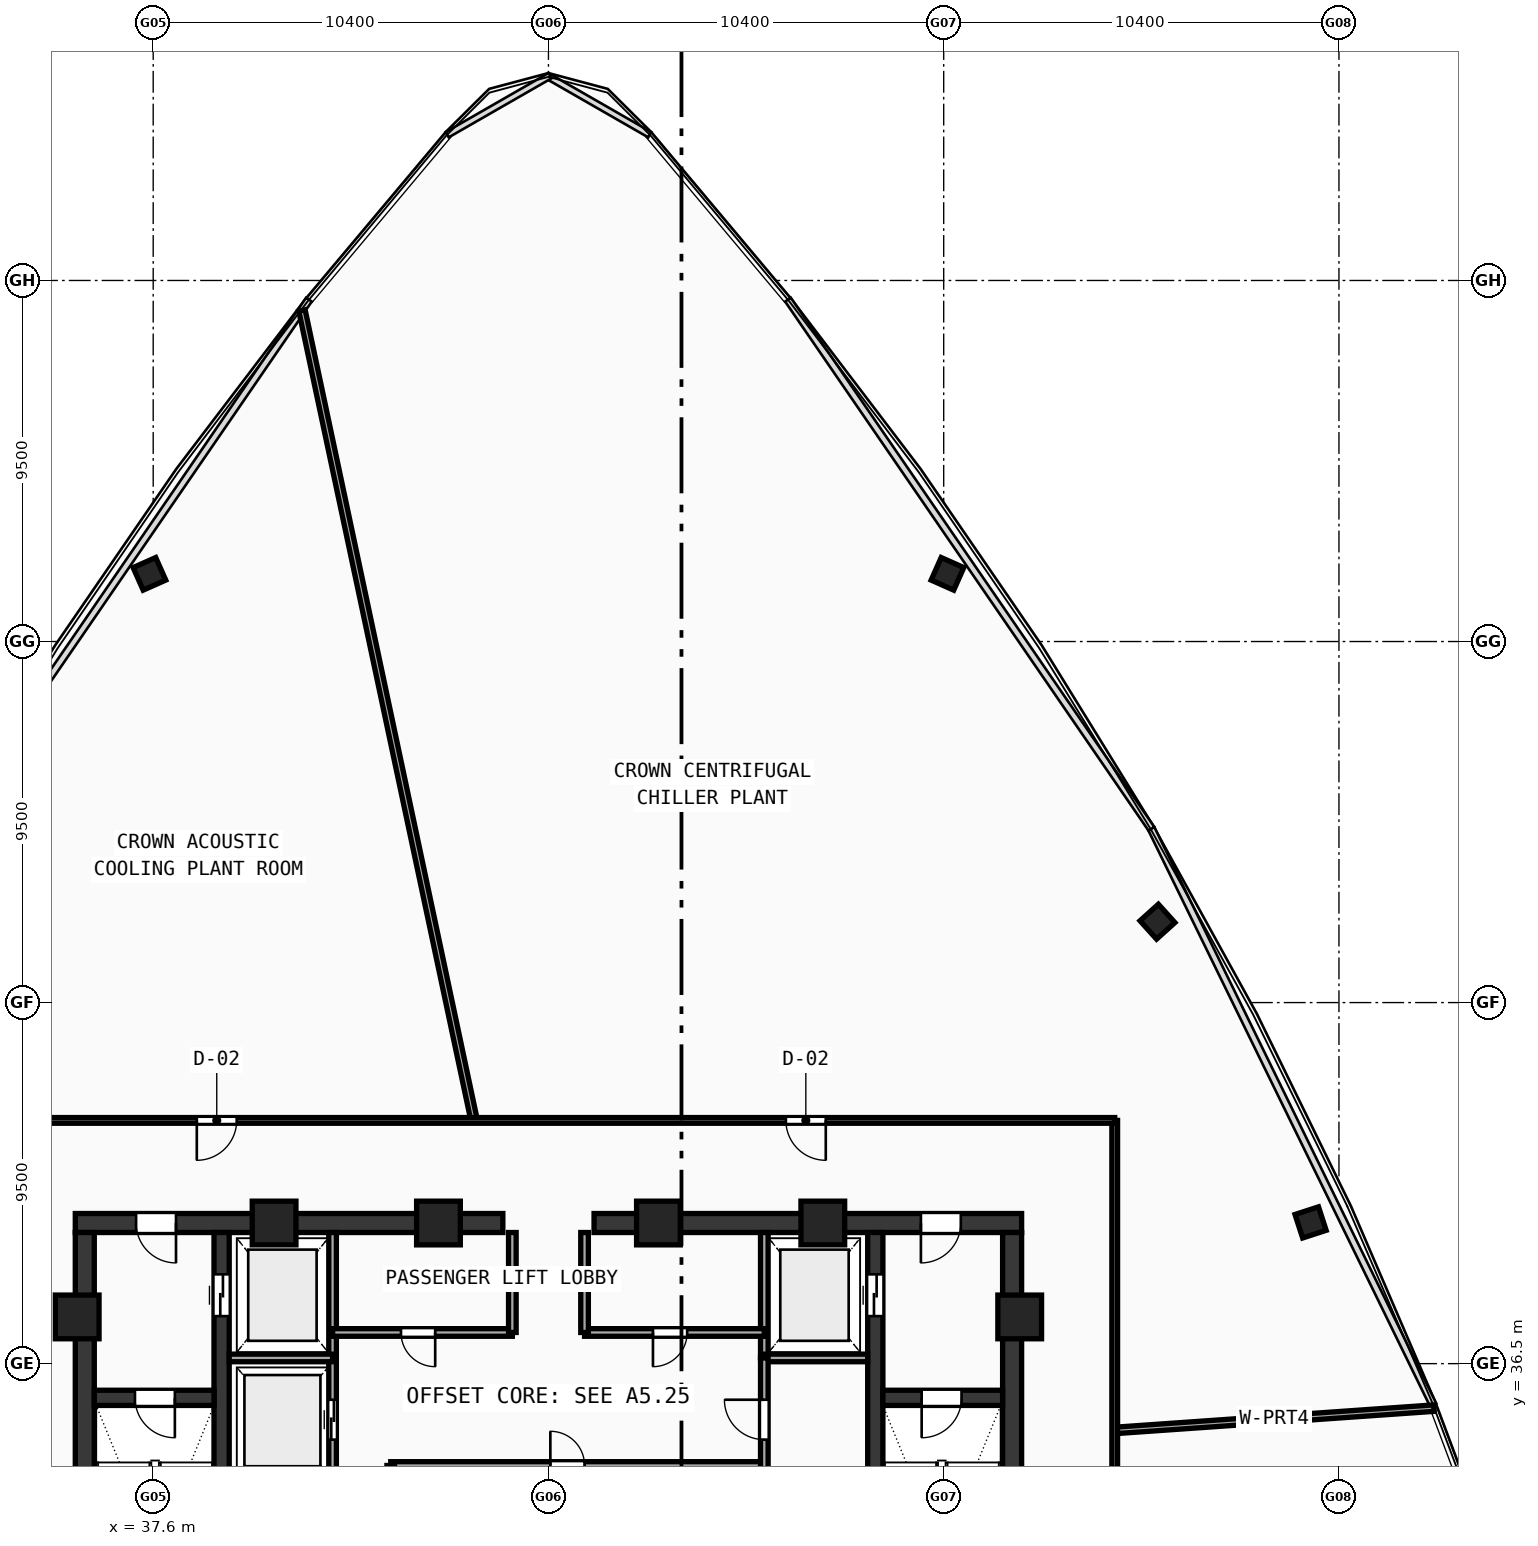
"""IFC4 building model, lengths in metres.
Left out: names, types, materials, properties, quantities, classifications, styles, units other than length and angle.
Written with IfcOpenShell. Run it as: python <this file> out.ifc"""

import sys

from ifc_helpers import new_model, si_unit, direction, frame, frame_2d, origin, origin_with_axes, origin_2d, place, context, subcontext, project, spatial, rectangle, hollow_rectangle, extrude, source, transform, mapped, element, fill, save


model = new_model("IFC4")
c1 = context("Model", 3, precision=1e-05, world=origin(), true_north=direction((0.0, 1.0)))
c2 = subcontext(c1, "Body", "Model", "MODEL_VIEW")
j1 = project(units=[si_unit("LENGTHUNIT", "METRE"), si_unit("PLANEANGLEUNIT", "RADIAN")], contexts=[c1])
p1 = place(None, origin())
s1 = spatial("IfcSite", under=j1, at=p1, CompositionType="ELEMENT")
p2 = place(p1, origin())
s2 = spatial("IfcBuilding", under=s1, at=p2, CompositionType="ELEMENT")
p3 = place(p2, frame((0.0, 0.0, 391.76)))
s3 = spatial("IfcBuildingStorey", under=s2, at=p3, CompositionType="ELEMENT", Elevation=391.76)
p4 = place(p3, frame((35.55, 40.2, 0.0), z_axis=(0.0, 0.0, 1.0), x_axis=(1.0, 0.0, 0.0)))
e1 = element("IfcWall", 1, at=p4, inside=s3, PredefinedType="SHEAR", context=c2, shape_type="SweptSolid", body=[
    extrude(rectangle(XDim=11.25, YDim=0.5, at=frame_2d((5.625, 0.0))), origin(), (0.0, 0.0, 1.0), 4.72),
])
p5 = place(p4, frame((1.6, 0.0, 0.0)))
e2 = element("IfcOpeningElement", 2, at=p5, cuts=e1, PredefinedType="OPENING", context=c2, shape_type="SweptSolid", body=[
    extrude(rectangle(XDim=1.05, YDim=2.1, at=frame_2d((0.525, 1.05))), frame((0.0, 0.26, 0.0), z_axis=(0.0, -1.0, 0.0), x_axis=(1.0, 0.0, 0.0)), (0.0, 0.0, 1.0), 0.52),
])
p6 = place(p3, frame((49.2, 40.2, 0.0), z_axis=(0.0, 0.0, 1.0), x_axis=(1.0, 0.0, 0.0)))
e3 = element("IfcWall", 3, at=p6, inside=s3, PredefinedType="SHEAR", context=c2, shape_type="SweptSolid", body=[
    extrude(rectangle(XDim=11.25, YDim=0.5, at=frame_2d((5.625, 0.0))), origin(), (0.0, 0.0, 1.0), 4.72),
])
p7 = place(p6, frame((8.6, 0.0, 0.0)))
e4 = element("IfcOpeningElement", 4, at=p7, cuts=e3, PredefinedType="OPENING", context=c2, shape_type="SweptSolid", body=[
    extrude(rectangle(XDim=1.05, YDim=2.1, at=frame_2d((0.525, 1.05))), frame((0.0, 0.26, 0.0), z_axis=(0.0, -1.0, 0.0), x_axis=(1.0, 0.0, 0.0)), (0.0, 0.0, 1.0), 0.52),
])
for number, where, z_axis, x_axis in (
    (5, (35.8, 27.75, 0.0), (0.0, 0.0, 1.0), (0.0, 1.0, 0.0)),
    (6, (60.2, 27.75, 0.0), (0.0, 0.0, 1.0), (0.0, 1.0, 0.0)),
):
    element("IfcWall", number, at=place(p3, frame(where, z_axis=z_axis, x_axis=x_axis)), inside=s3, PredefinedType="SHEAR", context=c2, shape_type="SweptSolid", body=[
        extrude(rectangle(XDim=12.2, YDim=0.5, at=frame_2d((6.1, 0.0))), origin(), (0.0, 0.0, 1.0), 4.72),
    ])
p8 = place(p3, frame((39.4, 27.75, 0.0), z_axis=(0.0, 0.0, 1.0), x_axis=(0.0, 1.0, 0.0)))
e7 = element("IfcWall", 7, at=p8, inside=s3, PredefinedType="SHEAR", context=c2, shape_type="SweptSolid", body=[
    extrude(rectangle(XDim=12.2, YDim=0.4, at=frame_2d((6.1, 0.0))), origin(), (0.0, 0.0, 1.0), 4.72),
])
p9 = place(p8, frame((10.0, 0.0, 0.0)))
e8 = element("IfcOpeningElement", 8, at=p9, cuts=e7, PredefinedType="OPENING", context=c2, shape_type="SweptSolid", body=[
    extrude(rectangle(XDim=1.1, YDim=2.1, at=frame_2d((0.55, 1.05))), frame((0.0, 0.21, 0.0), z_axis=(0.0, -1.0, 0.0), x_axis=(1.0, 0.0, 0.0)), (0.0, 0.0, 1.0), 0.42),
])
p10 = place(p3, frame((56.6, 27.75, 0.0), z_axis=(0.0, 0.0, 1.0), x_axis=(0.0, 1.0, 0.0)))
e9 = element("IfcWall", 9, at=p10, inside=s3, PredefinedType="SHEAR", context=c2, shape_type="SweptSolid", body=[
    extrude(rectangle(XDim=12.2, YDim=0.4, at=frame_2d((6.1, 0.0))), origin(), (0.0, 0.0, 1.0), 4.72),
])
p11 = place(p10, frame((10.0, 0.0, 0.0)))
e10 = element("IfcOpeningElement", 10, at=p11, cuts=e9, PredefinedType="OPENING", context=c2, shape_type="SweptSolid", body=[
    extrude(rectangle(XDim=1.1, YDim=2.1, at=frame_2d((0.55, 1.05))), frame((0.0, 0.21, 0.0), z_axis=(0.0, -1.0, 0.0), x_axis=(1.0, 0.0, 0.0)), (0.0, 0.0, 1.0), 0.42),
])
p12 = place(p3, frame((36.05, 35.6, 0.0), z_axis=(0.0, 0.0, 1.0), x_axis=(1.0, 0.0, 0.0)))
e11 = element("IfcWall", 11, at=p12, inside=s3, PredefinedType="SHEAR", context=c2, shape_type="SweptSolid", body=[
    extrude(rectangle(XDim=3.15, YDim=0.4, at=frame_2d((1.575, 0.0))), origin(), (0.0, 0.0, 1.0), 4.72),
])
p13 = place(p12, frame((1.07, 0.0, 0.0)))
e12 = element("IfcOpeningElement", 12, at=p13, cuts=e11, PredefinedType="OPENING", context=c2, shape_type="SweptSolid", body=[
    extrude(rectangle(XDim=1.05, YDim=2.1, at=frame_2d((0.525, 1.05))), frame((0.0, 0.21, 0.0), z_axis=(0.0, -1.0, 0.0), x_axis=(1.0, 0.0, 0.0)), (0.0, 0.0, 1.0), 0.42),
])
p14 = place(p3, frame((56.8, 35.6, 0.0), z_axis=(0.0, 0.0, 1.0), x_axis=(1.0, 0.0, 0.0)))
e13 = element("IfcWall", 13, at=p14, inside=s3, PredefinedType="SHEAR", context=c2, shape_type="SweptSolid", body=[
    extrude(rectangle(XDim=3.15, YDim=0.4, at=frame_2d((1.575, 0.0))), origin(), (0.0, 0.0, 1.0), 4.72),
])
p15 = place(p14, frame((1.02, 0.0, 0.0)))
e14 = element("IfcOpeningElement", 14, at=p15, cuts=e13, PredefinedType="OPENING", context=c2, shape_type="SweptSolid", body=[
    extrude(rectangle(XDim=1.05, YDim=2.1, at=frame_2d((0.525, 1.05))), frame((0.0, 0.21, 0.0), z_axis=(0.0, -1.0, 0.0), x_axis=(1.0, 0.0, 0.0)), (0.0, 0.0, 1.0), 0.42),
])
m1 = source(origin(), c2, "Body", "SweptSolid", [
    extrude(hollow_rectangle(XDim=1.15, YDim=1.15, WallThickness=0.048, at=origin_2d()), origin(), (0.0, 0.0, 1.0), 5.0),
])
for number, where, z_axis, x_axis in (
    (15, (60.4, 37.729, -0.28), (0.0, 0.0, 1.0), (1.0, 0.0, 0.0)),
    (16, (55.219, 40.2, -0.28), (0.0, 0.0, 1.0), (1.0, 0.0, 0.0)),
    (17, (50.894, 40.2, -0.28), (0.0, 0.0, 1.0), (1.0, 0.0, 0.0)),
    (18, (45.106, 40.2, -0.28), (0.0, 0.0, 1.0), (1.0, 0.0, 0.0)),
    (19, (40.781, 40.2, -0.28), (0.0, 0.0, 1.0), (1.0, 0.0, 0.0)),
    (20, (35.6, 37.729, -0.28), (0.0, 0.0, 1.0), (1.0, 0.0, 0.0)),
):
    element("IfcColumn", number, at=place(p3, frame(where, z_axis=z_axis, x_axis=x_axis)), inside=s3, PredefinedType="COLUMN", context=c2, shape_type="MappedRepresentation", body=[
        mapped(m1, transform((0.0, 0.0, 0.0), scale=1.0)),
    ])
m2 = source(origin(), c2, "Body", "SweptSolid", [
    extrude(hollow_rectangle(XDim=0.65, YDim=0.65, WallThickness=0.024, at=origin_2d()), origin(), (0.0, 0.0, 1.0), 5.0),
])
for number, where, z_axis, x_axis in (
    (21, (68.053, 40.216, -0.28), (0.0, 0.0, 1.0), (-0.309, 0.951, 0.0)),
    (22, (64.025, 48.129, -0.28), (0.0, 0.0, 1.0), (-0.669, 0.743, 0.0)),
    (23, (58.499, 57.281, -0.28), (0.0, 0.0, 1.0), (-0.914, 0.407, 0.0)),
    (24, (37.501, 57.281, -0.28), (0.0, 0.0, 1.0), (-0.914, -0.407, 0.0)),
):
    element("IfcColumn", number, at=place(p3, frame(where, z_axis=z_axis, x_axis=x_axis)), inside=s3, PredefinedType="COLUMN", context=c2, shape_type="MappedRepresentation", body=[
        mapped(m2, transform((0.0, 0.0, 0.0), scale=1.0)),
    ])
p16 = place(p3, frame((42.32, 33.5, 0.0), z_axis=(0.0, 0.0, 1.0), x_axis=(0.0, 1.0, 0.0)))
e25 = element("IfcWall", 25, at=p16, inside=s3, PredefinedType="SOLIDWALL", context=c2, shape_type="SweptSolid", body=[
    extrude(rectangle(XDim=6.45, YDim=0.2, at=frame_2d((3.225, 0.0))), origin(), (0.0, 0.0, 1.0), 4.72),
])
p17 = place(p16, frame((1.0, 0.0, 0.0)))
e26 = element("IfcOpeningElement", 26, at=p17, cuts=e25, PredefinedType="OPENING", context=c2, shape_type="SweptSolid", body=[
    extrude(rectangle(XDim=1.05, YDim=2.1, at=frame_2d((0.525, 1.05))), frame((0.0, 0.11, 0.0), z_axis=(0.0, -1.0, 0.0), x_axis=(1.0, 0.0, 0.0)), (0.0, 0.0, 1.0), 0.22),
])
p18 = place(p3, frame((39.6, 36.65, 0.0), z_axis=(0.0, 0.0, 1.0), x_axis=(1.0, 0.0, 0.0)))
e27 = element("IfcWall", 27, at=p18, inside=s3, PredefinedType="SOLIDWALL", context=c2, shape_type="SweptSolid", body=[
    extrude(rectangle(XDim=2.72, YDim=0.2, at=frame_2d((1.36, 0.0))), origin(), (0.0, 0.0, 1.0), 4.72),
])
p19 = place(p3, frame((53.68, 36.65, 0.0), z_axis=(0.0, 0.0, 1.0), x_axis=(0.0, 1.0, 0.0)))
e28 = element("IfcWall", 28, at=p19, inside=s3, PredefinedType="SOLIDWALL", context=c2, shape_type="SweptSolid", body=[
    extrude(rectangle(XDim=3.3, YDim=0.2, at=frame_2d((1.65, 0.0))), origin(), (0.0, 0.0, 1.0), 4.72),
])
p20 = place(p3, frame((53.68, 36.65, 0.0), z_axis=(0.0, 0.0, 1.0), x_axis=(1.0, 0.0, 0.0)))
e29 = element("IfcWall", 29, at=p20, inside=s3, PredefinedType="SOLIDWALL", context=c2, shape_type="SweptSolid", body=[
    extrude(rectangle(XDim=2.72, YDim=0.2, at=frame_2d((1.36, 0.0))), origin(), (0.0, 0.0, 1.0), 4.72),
])
p21 = place(p3, frame((42.32, 37.32, 0.0), z_axis=(0.0, 0.0, 1.0), x_axis=(1.0, 0.0, 0.0)))
e30 = element("IfcWall", 30, at=p21, inside=s3, PredefinedType="SOLIDWALL", context=c2, shape_type="SweptSolid", body=[
    extrude(rectangle(XDim=4.73, YDim=0.2, at=frame_2d((2.365, 0.0))), origin(), (0.0, 0.0, 1.0), 4.72),
])
p22 = place(p21, frame((1.8, 0.0, 0.0)))
e31 = element("IfcOpeningElement", 31, at=p22, cuts=e30, PredefinedType="OPENING", context=c2, shape_type="SweptSolid", body=[
    extrude(rectangle(XDim=0.9, YDim=2.1, at=frame_2d((0.45, 1.05))), frame((0.0, 0.11, 0.0), z_axis=(0.0, -1.0, 0.0), x_axis=(1.0, 0.0, 0.0)), (0.0, 0.0, 1.0), 0.22),
])
p23 = place(p3, frame((48.95, 37.32, 0.0), z_axis=(0.0, 0.0, 1.0), x_axis=(1.0, 0.0, 0.0)))
e32 = element("IfcWall", 32, at=p23, inside=s3, PredefinedType="SOLIDWALL", context=c2, shape_type="SweptSolid", body=[
    extrude(rectangle(XDim=4.73, YDim=0.2, at=frame_2d((2.365, 0.0))), origin(), (0.0, 0.0, 1.0), 4.72),
])
p24 = place(p23, frame((1.8, 0.0, 0.0)))
e33 = element("IfcOpeningElement", 33, at=p24, cuts=e32, PredefinedType="OPENING", context=c2, shape_type="SweptSolid", body=[
    extrude(rectangle(XDim=0.9, YDim=2.1, at=frame_2d((0.45, 1.05))), frame((0.0, 0.11, 0.0), z_axis=(0.0, -1.0, 0.0), x_axis=(1.0, 0.0, 0.0)), (0.0, 0.0, 1.0), 0.22),
])
for number, where, z_axis, x_axis in (
    (34, (47.05, 37.32, 0.0), (0.0, 0.0, 1.0), (0.0, 1.0, 0.0)),
    (35, (48.95, 37.32, 0.0), (0.0, 0.0, 1.0), (0.0, 1.0, 0.0)),
):
    element("IfcWall", number, at=place(p3, frame(where, z_axis=z_axis, x_axis=x_axis)), inside=s3, PredefinedType="SOLIDWALL", context=c2, shape_type="SweptSolid", body=[
        extrude(rectangle(XDim=2.63, YDim=0.2, at=frame_2d((1.315, 0.0))), origin(), (0.0, 0.0, 1.0), 4.72),
    ])
p25 = place(p3, frame((43.85, 33.82, 0.0), z_axis=(0.0, 0.0, 1.0), x_axis=(1.0, 0.0, 0.0)))
e36 = element("IfcWall", 36, at=p25, inside=s3, PredefinedType="SOLIDWALL", context=c2, shape_type="SweptSolid", body=[
    extrude(rectangle(XDim=9.83, YDim=0.2, at=frame_2d((4.915, 0.0))), origin(), (0.0, 0.0, 1.0), 4.72),
])
p26 = place(p25, frame((4.2, 0.0, 0.0)))
e37 = element("IfcOpeningElement", 37, at=p26, cuts=e36, PredefinedType="OPENING", context=c2, shape_type="SweptSolid", body=[
    extrude(rectangle(XDim=0.9, YDim=2.1, at=frame_2d((0.45, 1.05))), frame((0.0, 0.11, 0.0), z_axis=(0.0, -1.0, 0.0), x_axis=(1.0, 0.0, 0.0)), (0.0, 0.0, 1.0), 0.22),
])
p27 = place(p3, frame((43.85, 27.6, 0.0), z_axis=(0.0, 0.0, 1.0), x_axis=(0.0, 1.0, 0.0)))
e38 = element("IfcWall", 38, at=p27, inside=s3, PredefinedType="SOLIDWALL", context=c2, shape_type="SweptSolid", body=[
    extrude(rectangle(XDim=6.22, YDim=0.2, at=frame_2d((3.11, 0.0))), origin(), (0.0, 0.0, 1.0), 4.72),
])
p28 = place(p27, frame((2.25, 0.0, 0.0)))
e39 = element("IfcOpeningElement", 39, at=p28, cuts=e38, PredefinedType="OPENING", context=c2, shape_type="SweptSolid", body=[
    extrude(rectangle(XDim=1.05, YDim=2.1, at=frame_2d((0.525, 1.05))), frame((0.0, 0.11, 0.0), z_axis=(0.0, -1.0, 0.0), x_axis=(1.0, 0.0, 0.0)), (0.0, 0.0, 1.0), 0.22),
])
p29 = place(p3, frame((53.68, 27.6, 0.0), z_axis=(0.0, 0.0, 1.0), x_axis=(0.0, 1.0, 0.0)))
e40 = element("IfcWall", 40, at=p29, inside=s3, PredefinedType="SOLIDWALL", context=c2, shape_type="SweptSolid", body=[
    extrude(rectangle(XDim=9.05, YDim=0.2, at=frame_2d((4.525, 0.0))), origin(), (0.0, 0.0, 1.0), 4.72),
])
p30 = place(p29, frame((6.9, 0.0, 0.0)))
e41 = element("IfcOpeningElement", 41, at=p30, cuts=e40, PredefinedType="OPENING", context=c2, shape_type="SweptSolid", body=[
    extrude(rectangle(XDim=1.05, YDim=2.1, at=frame_2d((0.525, 1.05))), frame((0.0, 0.11, 0.0), z_axis=(0.0, -1.0, 0.0), x_axis=(1.0, 0.0, 0.0)), (0.0, 0.0, 1.0), 0.22),
])
p31 = place(p3, frame((62.9, 34.742, 0.0), z_axis=(0.0, 0.0, 1.0), x_axis=(0.997563993403, 0.069757286835, 0.0)))
e42 = element("IfcWall", 42, at=p31, inside=s3, PredefinedType="PARTITIONING", context=c2, shape_type="SweptSolid", body=[
    extrude(rectangle(XDim=8.421, YDim=0.17, at=frame_2d((4.21, 0.0))), origin(), (0.0, 0.0, 1.0), 4.12),
])
p32 = place(p3, frame((46.044, 42.9, 0.0), z_axis=(0.0, 0.0, 1.0), x_axis=(-0.207906465553, 0.978148711384, 0.0)))
e43 = element("IfcWall", 43, at=p32, inside=s3, PredefinedType="PARTITIONING", context=c2, shape_type="SweptSolid", body=[
    extrude(rectangle(XDim=21.788, YDim=0.17, at=frame_2d((10.894, 0.0))), origin(), (0.0, 0.0, 1.0), 4.12),
])
p33 = place(p3, frame((62.9, 24.9, 0.0), z_axis=(0.0, 0.0, 1.0), x_axis=(0.0, 1.0, 0.0)))
e44 = element("IfcWall", 44, at=p33, inside=s3, PredefinedType="PARTITIONING", context=c2, shape_type="SweptSolid", body=[
    extrude(rectangle(XDim=18.0, YDim=0.15, at=frame_2d((9.0, 0.0))), origin(), (0.0, 0.0, 1.0), 4.12),
])
p34 = place(p3, frame((62.9, 42.9, 0.0), z_axis=(0.0, 0.0, 1.0), x_axis=(-1.0, 0.0, 0.0)))
e45 = element("IfcWall", 45, at=p34, inside=s3, PredefinedType="PARTITIONING", context=c2, shape_type="SweptSolid", body=[
    extrude(rectangle(XDim=29.8, YDim=0.15, at=frame_2d((14.9, 0.0))), origin(), (0.0, 0.0, 1.0), 4.12),
])
p35 = place(p34, frame((7.603, 0.0, 0.0)))
e46 = element("IfcOpeningElement", 46, at=p35, cuts=e45, PredefinedType="OPENING", context=c2, shape_type="SweptSolid", body=[
    extrude(rectangle(XDim=1.05, YDim=2.1, at=frame_2d((0.525, 1.05))), frame((0.0, 0.085, 0.0), z_axis=(0.0, -1.0, 0.0), x_axis=(1.0, 0.0, 0.0)), (0.0, 0.0, 1.0), 0.17),
])
p36 = place(p34, frame((23.103, 0.0, 0.0)))
e47 = element("IfcOpeningElement", 47, at=p36, cuts=e45, PredefinedType="OPENING", context=c2, shape_type="SweptSolid", body=[
    extrude(rectangle(XDim=1.05, YDim=2.1, at=frame_2d((0.525, 1.05))), frame((0.0, 0.085, 0.0), z_axis=(0.0, -1.0, 0.0), x_axis=(1.0, 0.0, 0.0)), (0.0, 0.0, 1.0), 0.17),
])
m3 = source(origin(), c2, "Body", "SweptSolid", [
    extrude(rectangle(XDim=1.05, YDim=2.1, at=frame_2d((0.525, 1.05))), frame((0.0, 0.025, 0.0), z_axis=(0.0, -1.0, 0.0), x_axis=(1.0, 0.0, 0.0)), (0.0, 0.0, 1.0), 0.05),
])
p37 = place(p13, frame((1.05, 0.0, 0.0), z_axis=(0.0, 0.0, 1.0), x_axis=(-1.0, 0.0, 0.0)))
e48 = element("IfcDoor", 48, at=p37, inside=s3, OperationType="SINGLE_SWING_LEFT", PredefinedType="DOOR", context=c2, shape_type="MappedRepresentation", body=[
    mapped(m3, transform((0.0, 0.0, 0.0), scale=1.0)),
])
fill(e12, e48)
p38 = place(p15, frame((1.05, 0.0, 0.0), z_axis=(0.0, 0.0, 1.0), x_axis=(-1.0, 0.0, 0.0)))
e49 = element("IfcDoor", 49, at=p38, inside=s3, OperationType="SINGLE_SWING_RIGHT", PredefinedType="DOOR", context=c2, shape_type="MappedRepresentation", body=[
    mapped(m3, transform((0.0, 0.0, 0.0), scale=1.0)),
])
fill(e14, e49)
p39 = place(p5, frame((1.05, 0.0, 0.0), z_axis=(0.0, 0.0, 1.0), x_axis=(-1.0, 0.0, 0.0)))
e50 = element("IfcDoor", 50, at=p39, inside=s3, OperationType="SINGLE_SWING_LEFT", PredefinedType="DOOR", context=c2, shape_type="MappedRepresentation", body=[
    mapped(m3, transform((0.0, 0.0, 0.0), scale=1.0)),
])
fill(e2, e50)
p40 = place(p7, frame((1.05, 0.0, 0.0), z_axis=(0.0, 0.0, 1.0), x_axis=(-1.0, 0.0, 0.0)))
e51 = element("IfcDoor", 51, at=p40, inside=s3, OperationType="SINGLE_SWING_RIGHT", PredefinedType="DOOR", context=c2, shape_type="MappedRepresentation", body=[
    mapped(m3, transform((0.0, 0.0, 0.0), scale=1.0)),
])
fill(e4, e51)
m4 = source(origin(), c2, "Body", "SweptSolid", [
    extrude(rectangle(XDim=1.1, YDim=2.1, at=frame_2d((0.55, 1.05))), frame((0.0, 0.025, 0.0), z_axis=(0.0, -1.0, 0.0), x_axis=(1.0, 0.0, 0.0)), (0.0, 0.0, 1.0), 0.05),
])
p41 = place(p9, frame((1.1, 0.0, 0.0), z_axis=(0.0, 0.0, 1.0), x_axis=(-1.0, 0.0, 0.0)))
e52 = element("IfcDoor", 52, at=p41, inside=s3, OperationType="DOUBLE_DOOR_SLIDING", PredefinedType="DOOR", context=c2, shape_type="MappedRepresentation", body=[
    mapped(m4, transform((0.0, 0.0, 0.0), scale=1.0)),
])
fill(e8, e52)
p42 = place(p11, origin_with_axes())
e53 = element("IfcDoor", 53, at=p42, inside=s3, OperationType="DOUBLE_DOOR_SLIDING", PredefinedType="DOOR", context=c2, shape_type="MappedRepresentation", body=[
    mapped(m4, transform((0.0, 0.0, 0.0), scale=1.0)),
])
fill(e10, e53)
p43 = place(p17, origin_with_axes())
e54 = element("IfcDoor", 54, at=p43, inside=s3, OperationType="DOUBLE_DOOR_SLIDING", PredefinedType="DOOR", context=c2, shape_type="MappedRepresentation", body=[
    mapped(m3, transform((0.0, 0.0, 0.0), scale=1.0)),
])
fill(e26, e54)
m5 = source(origin(), c2, "Body", "SweptSolid", [
    extrude(rectangle(XDim=0.9, YDim=2.1, at=frame_2d((0.45, 1.05))), frame((0.0, 0.025, 0.0), z_axis=(0.0, -1.0, 0.0), x_axis=(1.0, 0.0, 0.0)), (0.0, 0.0, 1.0), 0.05),
])
p44 = place(p22, frame((0.9, 0.0, 0.0), z_axis=(0.0, 0.0, 1.0), x_axis=(-1.0, 0.0, 0.0)))
e55 = element("IfcDoor", 55, at=p44, inside=s3, OperationType="SINGLE_SWING_LEFT", PredefinedType="DOOR", context=c2, shape_type="MappedRepresentation", body=[
    mapped(m5, transform((0.0, 0.0, 0.0), scale=1.0)),
])
fill(e31, e55)
p45 = place(p24, frame((0.9, 0.0, 0.0), z_axis=(0.0, 0.0, 1.0), x_axis=(-1.0, 0.0, 0.0)))
e56 = element("IfcDoor", 56, at=p45, inside=s3, OperationType="SINGLE_SWING_RIGHT", PredefinedType="DOOR", context=c2, shape_type="MappedRepresentation", body=[
    mapped(m5, transform((0.0, 0.0, 0.0), scale=1.0)),
])
fill(e33, e56)
p46 = place(p26, origin_with_axes())
e57 = element("IfcDoor", 57, at=p46, inside=s3, OperationType="SINGLE_SWING_LEFT", PredefinedType="DOOR", context=c2, shape_type="MappedRepresentation", body=[
    mapped(m5, transform((0.0, 0.0, 0.0), scale=1.0)),
])
fill(e37, e57)
p47 = place(p30, origin_with_axes())
e58 = element("IfcDoor", 58, at=p47, inside=s3, OperationType="SINGLE_SWING_RIGHT", PredefinedType="DOOR", context=c2, shape_type="MappedRepresentation", body=[
    mapped(m3, transform((0.0, 0.0, 0.0), scale=1.0)),
])
fill(e41, e58)
p48 = place(p35, origin_with_axes())
e59 = element("IfcDoor", 59, at=p48, inside=s3, OperationType="SINGLE_SWING_LEFT", PredefinedType="DOOR", context=c2, shape_type="MappedRepresentation", body=[
    mapped(m3, transform((0.0, 0.0, 0.0), scale=1.0)),
])
fill(e46, e59)
p49 = place(p36, origin_with_axes())
e60 = element("IfcDoor", 60, at=p49, inside=s3, OperationType="SINGLE_SWING_RIGHT", PredefinedType="DOOR", context=c2, shape_type="MappedRepresentation", body=[
    mapped(m3, transform((0.0, 0.0, 0.0), scale=1.0)),
])
fill(e47, e60)
save(model, sys.argv[1])
